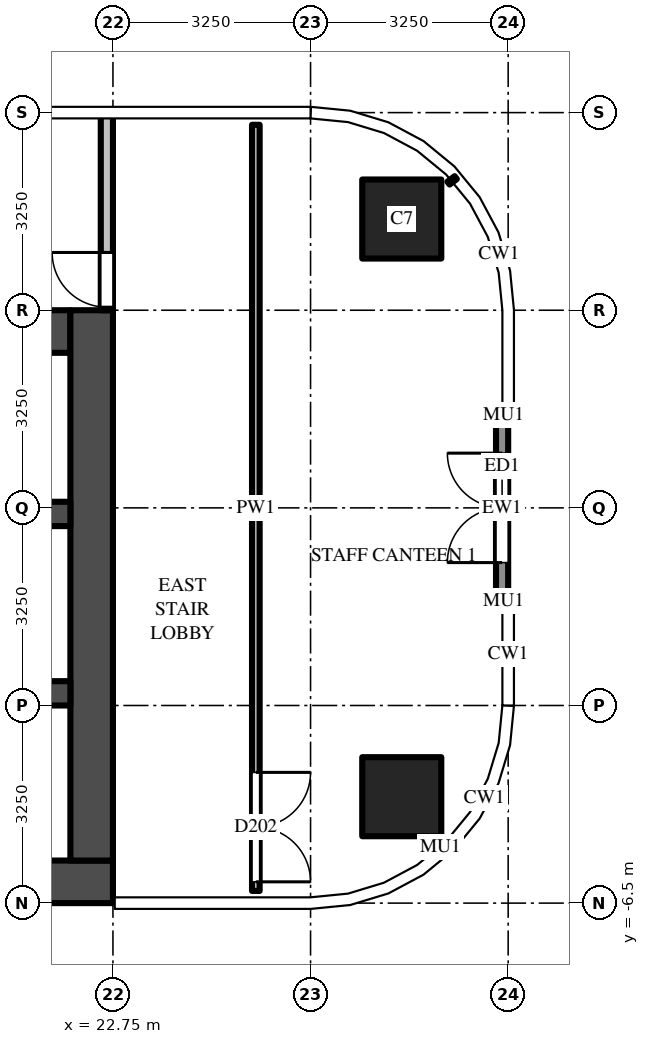
"""IFC4 building model, lengths in metres.
Left out: names, types, materials, properties, quantities, classifications, styles, units other than length and angle.
Written with IfcOpenShell. Run it as: python <this file> out.ifc"""

import sys

from ifc_helpers import new_model, si_unit, direction, frame, frame_2d, origin, origin_2d, place, context, subcontext, project, spatial, rectangle, extrude, source, transform, mapped, element, fill, save


model = new_model("IFC4")
c1 = context("Model", 3, precision=1e-05, world=origin(), true_north=direction((0.0, 1.0)))
c2 = subcontext(c1, "Body", "Model", "MODEL_VIEW")
j1 = project(units=[si_unit("LENGTHUNIT", "METRE"), si_unit("PLANEANGLEUNIT", "RADIAN")], contexts=[c1])
p1 = place(None, origin())
s1 = spatial("IfcSite", under=j1, at=p1, CompositionType="ELEMENT")
p2 = place(p1, origin())
s2 = spatial("IfcBuilding", under=s1, at=p2, CompositionType="ELEMENT")
p3 = place(p2, frame((0.0, 0.0, 115.5)))
s3 = spatial("IfcBuildingStorey", under=s2, at=p3, CompositionType="ELEMENT", Elevation=115.5)
m1 = source(origin(), c2, "Body", "SweptSolid", [
    extrude(rectangle(XDim=1.3, YDim=1.3, at=origin_2d()), origin(), (0.0, 0.0, 1.0), 4.5),
])
for number, where, z_axis, x_axis in (
    (1, (27.5, 4.75, 0.0), (0.0, 0.0, 1.0), (1.0, 0.0, 0.0)),
    (2, (27.5, -4.75, 0.0), (0.0, 0.0, 1.0), (1.0, 0.0, 0.0)),
):
    element("IfcColumn", number, at=place(p3, frame(where, z_axis=z_axis, x_axis=x_axis)), inside=s3, PredefinedType="COLUMN", context=c2, shape_type="MappedRepresentation", body=[
        mapped(m1, transform((0.0, 0.0, 0.0))),
    ])
m2 = source(origin(), c2, "Body", "SweptSolid", [
    extrude(rectangle(XDim=16.5, YDim=0.7, at=frame_2d((8.25, 0.0))), origin(), (0.0, 0.0, 1.0), 4.25),
])
p4 = place(p3, frame((6.25, -6.15, 0.0), z_axis=(0.0, 0.0, 1.0), x_axis=(1.0, 0.0, 0.0)))
e3 = element("IfcWall", 3, at=p4, inside=s3, PredefinedType="SHEAR", context=c2, shape_type="MappedRepresentation", body=[
    mapped(m2, transform((0.0, 0.0, 0.0))),
])
m3 = source(origin(), c2, "Body", "SweptSolid", [
    extrude(rectangle(XDim=14.85, YDim=0.7, at=frame_2d((7.425, 0.0))), origin(), (0.0, 0.0, 1.0), 4.25),
])
p5 = place(p3, frame((7.2, 2.9, 0.0), z_axis=(0.0, 0.0, 1.0), x_axis=(1.0, 0.0, 0.0)))
e4 = element("IfcWall", 4, at=p5, inside=s3, PredefinedType="SHEAR", context=c2, shape_type="MappedRepresentation", body=[
    mapped(m3, transform((0.0, 0.0, 0.0))),
])
m4 = source(origin(), c2, "Body", "SweptSolid", [
    extrude(rectangle(XDim=1.3, YDim=2.1, at=frame_2d((0.65, 1.05))), frame((0.0, 0.36, 0.0), z_axis=(0.0, -1.0, 0.0), x_axis=(1.0, 0.0, 0.0)), (0.0, 0.0, 1.0), 0.72),
])
p6 = place(p5, frame((12.2, 0.0, 0.0)))
e5 = element("IfcOpeningElement", 5, at=p6, cuts=e4, PredefinedType="OPENING", context=c2, shape_type="MappedRepresentation", body=[
    mapped(m4, transform((0.0, 0.0, 0.0))),
])
m5 = source(origin(), c2, "Body", "SweptSolid", [
    extrude(rectangle(XDim=1.2, YDim=2.1, at=frame_2d((0.6, 1.05))), frame((0.0, 0.36, 0.0), z_axis=(0.0, -1.0, 0.0), x_axis=(1.0, 0.0, 0.0)), (0.0, 0.0, 1.0), 0.72),
])
p7 = place(p5, frame((9.85, 0.0, 0.0)))
e6 = element("IfcOpeningElement", 6, at=p7, cuts=e4, PredefinedType="OPENING", context=c2, shape_type="MappedRepresentation", body=[
    mapped(m5, transform((0.0, 0.0, 0.0))),
])
m6 = source(origin(), c2, "Body", "SweptSolid", [
    extrude(rectangle(XDim=1.0, YDim=2.1, at=frame_2d((0.5, 1.05))), frame((0.0, 0.36, 0.0), z_axis=(0.0, -1.0, 0.0), x_axis=(1.0, 0.0, 0.0)), (0.0, 0.0, 1.0), 0.72),
])
p8 = place(p5, frame((7.9, 0.0, 0.0)))
e7 = element("IfcOpeningElement", 7, at=p8, cuts=e4, PredefinedType="OPENING", context=c2, shape_type="MappedRepresentation", body=[
    mapped(m6, transform((0.0, 0.0, 0.0))),
])
m7 = source(origin(), c2, "Body", "SweptSolid", [
    extrude(rectangle(XDim=0.8, YDim=2.1, at=frame_2d((0.4, 1.05))), frame((0.0, 0.36, 0.0), z_axis=(0.0, -1.0, 0.0), x_axis=(1.0, 0.0, 0.0)), (0.0, 0.0, 1.0), 0.72),
])
p9 = place(p5, frame((0.113, 0.0, 0.0)))
e8 = element("IfcOpeningElement", 8, at=p9, cuts=e4, PredefinedType="OPENING", context=c2, shape_type="MappedRepresentation", body=[
    mapped(m7, transform((0.0, 0.0, 0.0))),
])
p10 = place(p5, frame((1.288, 0.0, 0.0)))
e9 = element("IfcOpeningElement", 9, at=p10, cuts=e4, PredefinedType="OPENING", context=c2, shape_type="MappedRepresentation", body=[
    mapped(m7, transform((0.0, 0.0, 0.0))),
])
p11 = place(p5, frame((2.712, 0.0, 0.0)))
e10 = element("IfcOpeningElement", 10, at=p11, cuts=e4, PredefinedType="OPENING", context=c2, shape_type="MappedRepresentation", body=[
    mapped(m7, transform((0.0, 0.0, 0.0))),
])
p12 = place(p5, frame((3.887, 0.0, 0.0)))
e11 = element("IfcOpeningElement", 11, at=p12, cuts=e4, PredefinedType="OPENING", context=c2, shape_type="MappedRepresentation", body=[
    mapped(m7, transform((0.0, 0.0, 0.0))),
])
p13 = place(p5, frame((5.312, 0.0, 0.0)))
e12 = element("IfcOpeningElement", 12, at=p13, cuts=e4, PredefinedType="OPENING", context=c2, shape_type="MappedRepresentation", body=[
    mapped(m7, transform((0.0, 0.0, 0.0))),
])
p14 = place(p5, frame((6.488, 0.0, 0.0)))
e13 = element("IfcOpeningElement", 13, at=p14, cuts=e4, PredefinedType="OPENING", context=c2, shape_type="MappedRepresentation", body=[
    mapped(m7, transform((0.0, 0.0, 0.0))),
])
m8 = source(origin(), c2, "Body", "SweptSolid", [
    extrude(rectangle(XDim=9.05, YDim=0.7, at=frame_2d((4.525, 0.0))), origin(), (0.0, 0.0, 1.0), 4.25),
])
p15 = place(p3, frame((22.4, -5.8, 0.0), z_axis=(0.0, 0.0, 1.0), x_axis=(0.0, 1.0, 0.0)))
e14 = element("IfcWall", 14, at=p15, inside=s3, PredefinedType="SHEAR", context=c2, shape_type="MappedRepresentation", body=[
    mapped(m8, transform((0.0, 0.0, 0.0))),
])
m9 = source(origin(), c2, "Body", "SweptSolid", [
    extrude(rectangle(XDim=14.85, YDim=0.4, at=frame_2d((7.425, 0.0))), origin(), (0.0, 0.0, 1.0), 4.25),
])
p16 = place(p3, frame((7.2, -0.1, 0.0), z_axis=(0.0, 0.0, 1.0), x_axis=(1.0, 0.0, 0.0)))
e15 = element("IfcWall", 15, at=p16, inside=s3, PredefinedType="SHEAR", context=c2, shape_type="MappedRepresentation", body=[
    mapped(m9, transform((0.0, 0.0, 0.0))),
])
m10 = source(origin(), c2, "Body", "SweptSolid", [
    extrude(rectangle(XDim=1.0, YDim=2.1, at=frame_2d((0.5, 1.05))), frame((0.0, 0.21, 0.0), z_axis=(0.0, -1.0, 0.0), x_axis=(1.0, 0.0, 0.0)), (0.0, 0.0, 1.0), 0.42),
])
p17 = place(p16, frame((7.9, 0.0, 0.0)))
e16 = element("IfcOpeningElement", 16, at=p17, cuts=e15, PredefinedType="OPENING", context=c2, shape_type="MappedRepresentation", body=[
    mapped(m10, transform((0.0, 0.0, 0.0))),
])
m11 = source(origin(), c2, "Body", "SweptSolid", [
    extrude(rectangle(XDim=5.7, YDim=0.4, at=frame_2d((2.85, 0.0))), origin(), (0.0, 0.0, 1.0), 4.25),
])
p18 = place(p3, frame((16.35, -3.05, 0.0), z_axis=(0.0, 0.0, 1.0), x_axis=(1.0, 0.0, 0.0)))
e17 = element("IfcWall", 17, at=p18, inside=s3, PredefinedType="SHEAR", context=c2, shape_type="MappedRepresentation", body=[
    mapped(m11, transform((0.0, 0.0, 0.0))),
])
m12 = source(origin(), c2, "Body", "SweptSolid", [
    extrude(rectangle(XDim=3.25, YDim=0.2, at=frame_2d((1.625, 0.0))), origin(), (0.0, 0.0, 1.0), 4.25),
])
p19 = place(p3, frame((22.65, 3.25, 0.0), z_axis=(0.0, 0.0, 1.0), x_axis=(0.0, 1.0, 0.0)))
e18 = element("IfcWall", 18, at=p19, inside=s3, PredefinedType="PARTITIONING", context=c2, shape_type="MappedRepresentation", body=[
    mapped(m12, transform((0.0, 0.0, 0.0))),
])
m13 = source(origin(), c2, "Body", "SweptSolid", [
    extrude(rectangle(XDim=0.9, YDim=2.1, at=frame_2d((0.45, 1.05))), frame((0.0, 0.11, 0.0), z_axis=(0.0, -1.0, 0.0), x_axis=(1.0, 0.0, 0.0)), (0.0, 0.0, 1.0), 0.22),
])
p20 = place(p19, frame((0.05, 0.0, 0.0)))
e19 = element("IfcOpeningElement", 19, at=p20, cuts=e18, PredefinedType="OPENING", context=c2, shape_type="MappedRepresentation", body=[
    mapped(m13, transform((0.0, 0.0, 0.0))),
])
m14 = source(origin(), c2, "Body", "SweptSolid", [
    extrude(rectangle(XDim=3.0, YDim=0.2, at=frame_2d((1.5, 0.0))), origin(), (0.0, 0.0, 1.0), 4.25),
])
p21 = place(p3, frame((29.15, -1.5, 0.0), z_axis=(0.0, 0.0, 1.0), x_axis=(0.0, 1.0, 0.0)))
e20 = element("IfcWall", 20, at=p21, inside=s3, PredefinedType="SOLIDWALL", context=c2, shape_type="MappedRepresentation", body=[
    mapped(m14, transform((0.0, 0.0, 0.0))),
])
m15 = source(origin(), c2, "Body", "SweptSolid", [
    extrude(rectangle(XDim=1.8, YDim=2.4, at=frame_2d((0.9, 1.2))), frame((0.0, 0.11, 0.0), z_axis=(0.0, -1.0, 0.0), x_axis=(1.0, 0.0, 0.0)), (0.0, 0.0, 1.0), 0.22),
])
p22 = place(p21, frame((0.6, 0.0, 0.0)))
e21 = element("IfcOpeningElement", 21, at=p22, cuts=e20, PredefinedType="OPENING", context=c2, shape_type="MappedRepresentation", body=[
    mapped(m15, transform((0.0, 0.0, 0.0))),
])
m16 = source(origin(), c2, "Body", "SweptSolid", [
    extrude(rectangle(XDim=12.6, YDim=0.125, at=frame_2d((6.3, 0.0))), origin(), (0.0, 0.0, 1.0), 3.33),
])
p23 = place(p3, frame((25.1, 6.3, 0.0), z_axis=(0.0, 0.0, 1.0), x_axis=(0.0, -1.0, 0.0)))
e22 = element("IfcWall", 22, at=p23, inside=s3, PredefinedType="PARTITIONING", context=c2, shape_type="MappedRepresentation", body=[
    mapped(m16, transform((0.0, 0.0, 0.0))),
])
m17 = source(origin(), c2, "Body", "SweptSolid", [
    extrude(rectangle(XDim=1.8, YDim=2.1, at=frame_2d((0.9, 1.05))), frame((0.0, 0.073, 0.0), z_axis=(0.0, -1.0, 0.0), x_axis=(1.0, 0.0, 0.0)), (0.0, 0.0, 1.0), 0.145),
])
p24 = place(p23, frame((10.65, 0.0, 0.0)))
e23 = element("IfcOpeningElement", 23, at=p24, cuts=e22, PredefinedType="OPENING", context=c2, shape_type="MappedRepresentation", body=[
    mapped(m17, transform((0.0, 0.0, 0.0))),
])
m18 = source(origin(), c2, "Body", "SweptSolid", [
    extrude(rectangle(XDim=0.9, YDim=2.1, at=frame_2d((0.45, 1.05))), frame((0.0, 0.025, 0.0), z_axis=(0.0, -1.0, 0.0), x_axis=(1.0, 0.0, 0.0)), (0.0, 0.0, 1.0), 0.05),
])
p25 = place(p20, origin())
e24 = element("IfcDoor", 24, at=p25, inside=s3, OperationType="SINGLE_SWING_RIGHT", PredefinedType="DOOR", context=c2, shape_type="MappedRepresentation", body=[
    mapped(m18, transform((0.0, 0.0, 0.0))),
])
fill(e19, e24)
m19 = source(origin(), c2, "Body", "SweptSolid", [
    extrude(rectangle(XDim=1.8, YDim=2.4, at=frame_2d((0.9, 1.2))), frame((0.0, 0.025, 0.0), z_axis=(0.0, -1.0, 0.0), x_axis=(1.0, 0.0, 0.0)), (0.0, 0.0, 1.0), 0.05),
])
p26 = place(p22, origin())
e25 = element("IfcDoor", 25, at=p26, inside=s3, OperationType="DOUBLE_DOOR_SINGLE_SWING", PredefinedType="DOOR", context=c2, shape_type="MappedRepresentation", body=[
    mapped(m19, transform((0.0, 0.0, 0.0))),
])
fill(e21, e25)
m20 = source(origin(), c2, "Body", "SweptSolid", [
    extrude(rectangle(XDim=1.8, YDim=2.1, at=frame_2d((0.9, 1.05))), frame((0.0, 0.025, 0.0), z_axis=(0.0, -1.0, 0.0), x_axis=(1.0, 0.0, 0.0)), (0.0, 0.0, 1.0), 0.05),
])
p27 = place(p24, origin())
e26 = element("IfcDoor", 26, at=p27, inside=s3, OperationType="DOUBLE_DOOR_SINGLE_SWING", PredefinedType="DOOR", context=c2, shape_type="MappedRepresentation", body=[
    mapped(m20, transform((0.0, 0.0, 0.0))),
])
fill(e23, e26)
save(model, sys.argv[1])
